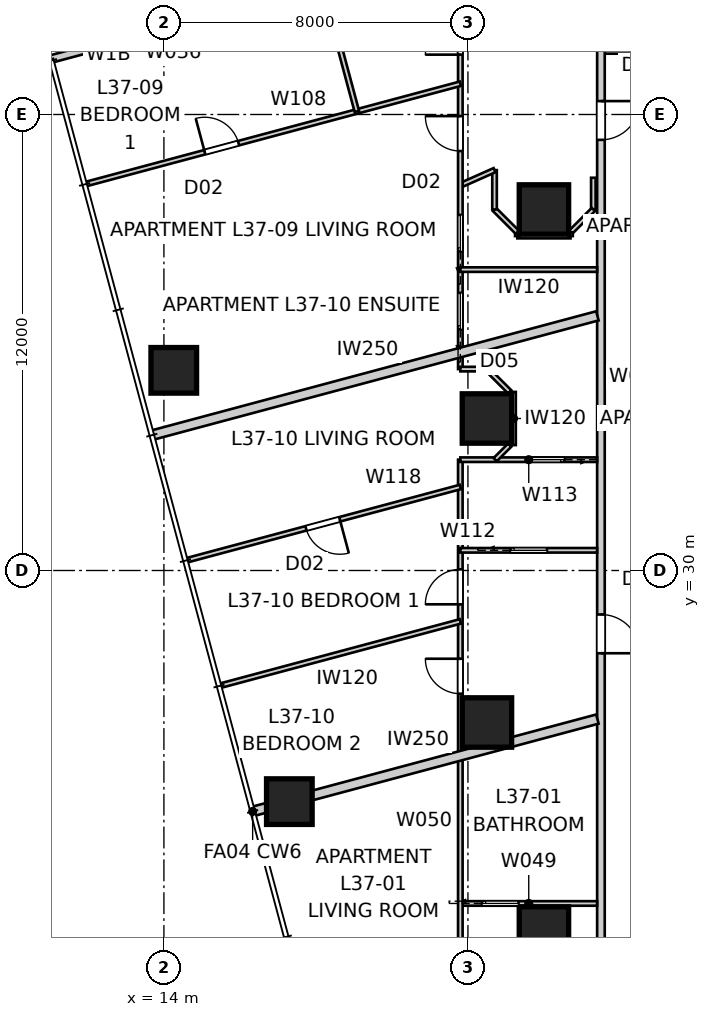
"""IFC4 building model, lengths in metres.
Left out: names, types, materials, properties, quantities, classifications, styles, units other than length and angle.
Written with IfcOpenShell. Run it as: python <this file> out.ifc"""

import sys

from ifc_helpers import new_model, si_unit, direction, frame, frame_2d, origin, origin_2d, place, context, subcontext, project, spatial, rectangle, extrude, element, fill, save


model = new_model("IFC4")
c1 = context("Model", 3, precision=1e-05, world=origin(), true_north=direction((0.0, 1.0)))
c2 = subcontext(c1, "Body", "Model", "MODEL_VIEW")
j1 = project(units=[si_unit("LENGTHUNIT", "METRE"), si_unit("PLANEANGLEUNIT", "RADIAN")], contexts=[c1])
p1 = place(None, origin())
s1 = spatial("IfcSite", under=j1, at=p1, CompositionType="ELEMENT")
p2 = place(p1, origin())
s2 = spatial("IfcBuilding", under=s1, at=p2, CompositionType="ELEMENT")
p3 = place(p2, frame((0.0, 0.0, 135.4)))
s3 = spatial("IfcBuildingStorey", under=s2, at=p3, CompositionType="ELEMENT", Elevation=135.4)
for number, where, z_axis, x_axis in (
    (1, (14.26, 35.267, 0.0), (0.0, 0.0, 1.0), (1.0, 0.0, 0.0)),
    (2, (17.301, 23.918, 0.0), (0.0, 0.0, 1.0), (1.0, 0.0, 0.0)),
):
    element("IfcColumn", number, at=place(p3, frame(where, z_axis=z_axis, x_axis=x_axis)), inside=s3, PredefinedType="COLUMN", context=c2, shape_type="SweptSolid", body=[
        extrude(rectangle(XDim=1.2, YDim=1.2, at=origin_2d()), origin(), (0.0, 0.0, 1.0), 3.2),
    ])
for number, where, z_axis, x_axis in (
    (3, (24.0, 39.5, 0.0), (0.0, 0.0, 1.0), (1.0, 0.0, 0.0)),
    (4, (22.5, 34.0, 0.0), (0.0, 0.0, 1.0), (1.0, 0.0, 0.0)),
    (5, (22.5, 26.0, 0.0), (0.0, 0.0, 1.0), (1.0, 0.0, 0.0)),
    (6, (24.0, 20.5, 0.0), (0.0, 0.0, 1.0), (1.0, 0.0, 0.0)),
):
    element("IfcColumn", number, at=place(p3, frame(where, z_axis=z_axis, x_axis=x_axis)), inside=s3, PredefinedType="COLUMN", context=c2, shape_type="SweptSolid", body=[
        extrude(rectangle(XDim=1.3, YDim=1.3, at=origin_2d()), origin(), (0.0, 0.0, 1.0), 3.4),
    ])
p4 = place(p3, frame((14.893, 44.496, 0.0), z_axis=(0.0, 0.0, 1.0), x_axis=(-0.965934430412, -0.258786931944, 0.0)))
e7 = element("IfcWall", 7, at=p4, inside=s3, PredefinedType="SOLIDWALL", context=c2, shape_type="SweptSolid", body=[
    extrude(rectangle(XDim=4.0, YDim=0.2, at=frame_2d((2.0, 0.0))), origin(), (0.0, 0.0, 1.0), 3.2),
])
p5 = place(p4, frame((1.0, 0.0, 0.4)))
e8 = element("IfcOpeningElement", 8, at=p5, cuts=e7, PredefinedType="OPENING", context=c2, shape_type="SweptSolid", body=[
    extrude(rectangle(XDim=2.0, YDim=1.8, at=frame_2d((1.0, 0.9))), frame((0.0, 0.11, 0.0), z_axis=(0.0, -1.0, 0.0), x_axis=(1.0, 0.0, 0.0)), (0.0, 0.0, 1.0), 0.22),
])
p6 = place(p3, frame((54.5, 43.7, 0.0), z_axis=(0.0, 0.0, 1.0), x_axis=(-1.0, 0.0, 0.0)))
e9 = element("IfcWall", 9, at=p6, inside=s3, PredefinedType="PARTITIONING", context=c2, shape_type="SweptSolid", body=[
    extrude(rectangle(XDim=29.0, YDim=0.2, at=frame_2d((14.5, 0.0))), origin(), (0.0, 0.0, 1.0), 3.2),
])
p7 = place(p6, frame((12.852, 0.0, 0.0)))
e10 = element("IfcOpeningElement", 10, at=p7, cuts=e9, PredefinedType="OPENING", context=c2, shape_type="SweptSolid", body=[
    extrude(rectangle(XDim=1.02, YDim=2.34, at=frame_2d((0.51, 1.17))), frame((0.0, 0.11, 0.0), z_axis=(0.0, -1.0, 0.0), x_axis=(1.0, 0.0, 0.0)), (0.0, 0.0, 1.0), 0.22),
])
p8 = place(p6, frame((5.529, 0.0, 0.0)))
e11 = element("IfcOpeningElement", 11, at=p8, cuts=e9, PredefinedType="OPENING", context=c2, shape_type="SweptSolid", body=[
    extrude(rectangle(XDim=1.02, YDim=2.34, at=frame_2d((0.51, 1.17))), frame((0.0, 0.11, 0.0), z_axis=(0.0, -1.0, 0.0), x_axis=(1.0, 0.0, 0.0)), (0.0, 0.0, 1.0), 0.22),
])
p9 = place(p3, frame((25.5, 43.7, 0.0), z_axis=(0.0, 0.0, 1.0), x_axis=(0.0, -1.0, 0.0)))
e12 = element("IfcWall", 12, at=p9, inside=s3, PredefinedType="PARTITIONING", context=c2, shape_type="SweptSolid", body=[
    extrude(rectangle(XDim=28.2, YDim=0.2, at=frame_2d((14.1, 0.0))), origin(), (0.0, 0.0, 1.0), 3.2),
])
p10 = place(p9, frame((24.646, 0.0, 0.0)))
e13 = element("IfcOpeningElement", 13, at=p10, cuts=e12, PredefinedType="OPENING", context=c2, shape_type="SweptSolid", body=[
    extrude(rectangle(XDim=1.02, YDim=2.0, at=frame_2d((0.51, 1.0))), frame((0.0, 0.11, 0.0), z_axis=(0.0, -1.0, 0.0), x_axis=(1.0, 0.0, 0.0)), (0.0, 0.0, 1.0), 0.22),
])
p11 = place(p9, frame((14.858, 0.0, 0.0)))
e14 = element("IfcOpeningElement", 14, at=p11, cuts=e12, PredefinedType="OPENING", context=c2, shape_type="SweptSolid", body=[
    extrude(rectangle(XDim=1.02, YDim=2.34, at=frame_2d((0.51, 1.17))), frame((0.0, 0.11, 0.0), z_axis=(0.0, -1.0, 0.0), x_axis=(1.0, 0.0, 0.0)), (0.0, 0.0, 1.0), 0.22),
])
p12 = place(p9, frame((1.347, 0.0, 0.0)))
e15 = element("IfcOpeningElement", 15, at=p12, cuts=e12, PredefinedType="OPENING", context=c2, shape_type="SweptSolid", body=[
    extrude(rectangle(XDim=1.02, YDim=2.0, at=frame_2d((0.51, 1.0))), frame((0.0, 0.11, 0.0), z_axis=(0.0, -1.0, 0.0), x_axis=(1.0, 0.0, 0.0)), (0.0, 0.0, 1.0), 0.22),
])
p13 = place(p3, frame((16.335, 23.659, 0.0), z_axis=(0.0, 0.0, 1.0), x_axis=(0.965927049013, 0.258814481793, 0.0)))
e16 = element("IfcWall", 16, at=p13, inside=s3, PredefinedType="PARTITIONING", context=c2, shape_type="SweptSolid", body=[
    extrude(rectangle(XDim=9.392, YDim=0.25, at=frame_2d((4.696, 0.0))), origin(), (0.0, 0.0, 1.0), 3.2),
])
p14 = place(p3, frame((13.682, 33.56, 0.0), z_axis=(0.0, 0.0, 1.0), x_axis=(0.965924438766, 0.258824223352, 0.0)))
e17 = element("IfcWall", 17, at=p14, inside=s3, PredefinedType="PARTITIONING", context=c2, shape_type="SweptSolid", body=[
    extrude(rectangle(XDim=12.138, YDim=0.25, at=frame_2d((6.069, 0.0))), origin(), (0.0, 0.0, 1.0), 3.2),
])
p15 = place(p3, frame((21.8, 21.238, 0.0), z_axis=(0.0, 0.0, 1.0), x_axis=(1.0, 0.0, 0.0)))
e18 = element("IfcWall", 18, at=p15, inside=s3, PredefinedType="PARTITIONING", context=c2, shape_type="SweptSolid", body=[
    extrude(rectangle(XDim=3.6, YDim=0.12, at=frame_2d((1.8, 0.0))), origin(), (0.0, 0.0, 1.0), 2.672),
])
p16 = place(p15, frame((0.57, 0.0, 0.0)))
e19 = element("IfcOpeningElement", 19, at=p16, cuts=e18, PredefinedType="OPENING", context=c2, shape_type="SweptSolid", body=[
    extrude(rectangle(XDim=0.96, YDim=2.1, at=frame_2d((0.48, 1.05))), frame((0.0, 0.07, 0.0), z_axis=(0.0, -1.0, 0.0), x_axis=(1.0, 0.0, 0.0)), (0.0, 0.0, 1.0), 0.14),
])
p17 = place(p3, frame((21.8, 11.8, 0.0), z_axis=(0.0, 0.0, 1.0), x_axis=(0.0, 1.0, 0.0)))
e20 = element("IfcWall", 20, at=p17, inside=s3, PredefinedType="PARTITIONING", context=c2, shape_type="SweptSolid", body=[
    extrude(rectangle(XDim=21.116, YDim=0.12, at=frame_2d((10.558, 0.0))), origin(), (0.0, 0.0, 1.0), 3.2),
])
p18 = place(p17, frame((4.046, 0.0, 0.0)))
e21 = element("IfcOpeningElement", 21, at=p18, cuts=e20, PredefinedType="OPENING", context=c2, shape_type="SweptSolid", body=[
    extrude(rectangle(XDim=0.92, YDim=2.34, at=frame_2d((0.46, 1.17))), frame((0.0, 0.07, 0.0), z_axis=(0.0, -1.0, 0.0), x_axis=(1.0, 0.0, 0.0)), (0.0, 0.0, 1.0), 0.14),
])
p19 = place(p17, frame((7.358, 0.0, 0.0)))
e22 = element("IfcOpeningElement", 22, at=p19, cuts=e20, PredefinedType="OPENING", context=c2, shape_type="SweptSolid", body=[
    extrude(rectangle(XDim=0.92, YDim=2.34, at=frame_2d((0.46, 1.17))), frame((0.0, 0.07, 0.0), z_axis=(0.0, -1.0, 0.0), x_axis=(1.0, 0.0, 0.0)), (0.0, 0.0, 1.0), 0.14),
])
p20 = place(p17, frame((14.958, 0.0, 0.0)))
e23 = element("IfcOpeningElement", 23, at=p20, cuts=e20, PredefinedType="OPENING", context=c2, shape_type="SweptSolid", body=[
    extrude(rectangle(XDim=0.92, YDim=2.34, at=frame_2d((0.46, 1.17))), frame((0.0, 0.07, 0.0), z_axis=(0.0, -1.0, 0.0), x_axis=(1.0, 0.0, 0.0)), (0.0, 0.0, 1.0), 0.14),
])
p21 = place(p17, frame((17.31, 0.0, 0.0)))
e24 = element("IfcOpeningElement", 24, at=p21, cuts=e20, PredefinedType="OPENING", context=c2, shape_type="SweptSolid", body=[
    extrude(rectangle(XDim=0.92, YDim=2.34, at=frame_2d((0.46, 1.17))), frame((0.0, 0.07, 0.0), z_axis=(0.0, -1.0, 0.0), x_axis=(1.0, 0.0, 0.0)), (0.0, 0.0, 1.0), 0.14),
])
p22 = place(p3, frame((25.3, 40.335, 0.0), z_axis=(0.0, 0.0, 1.0), x_axis=(0.0, -1.0, 0.0)))
e25 = element("IfcWall", 25, at=p22, inside=s3, PredefinedType="PARTITIONING", context=c2, shape_type="SweptSolid", body=[
    extrude(rectangle(XDim=0.835, YDim=0.12, at=frame_2d((0.417, 0.0))), origin(), (0.0, 0.0, 1.0), 3.2),
])
p23 = place(p3, frame((25.3, 39.5, 0.0), z_axis=(0.0, 0.0, 1.0), x_axis=(-0.707106781187, -0.707106781187, 0.0)))
e26 = element("IfcWall", 26, at=p23, inside=s3, PredefinedType="PARTITIONING", context=c2, shape_type="SweptSolid", body=[
    extrude(rectangle(XDim=0.849, YDim=0.12, at=frame_2d((0.424, 0.0))), origin(), (0.0, 0.0, 1.0), 3.2),
])
p24 = place(p3, frame((24.7, 38.8, 0.0), z_axis=(0.0, 0.0, 1.0), x_axis=(-1.0, 0.0, 0.0)))
e27 = element("IfcWall", 27, at=p24, inside=s3, PredefinedType="PARTITIONING", context=c2, shape_type="SweptSolid", body=[
    extrude(rectangle(XDim=1.4, YDim=0.12, at=frame_2d((0.7, 0.0))), origin(), (0.0, 0.0, 1.0), 2.672),
])
p25 = place(p3, frame((23.3, 38.9, 0.0), z_axis=(0.0, 0.0, 1.0), x_axis=(-0.707106781187, 0.707106781187, 0.0)))
e28 = element("IfcWall", 28, at=p25, inside=s3, PredefinedType="PARTITIONING", context=c2, shape_type="SweptSolid", body=[
    extrude(rectangle(XDim=0.849, YDim=0.12, at=frame_2d((0.424, 0.0))), origin(), (0.0, 0.0, 1.0), 3.2),
])
p26 = place(p3, frame((22.7, 39.5, 0.0), z_axis=(0.0, 0.0, 1.0), x_axis=(0.0, 1.0, 0.0)))
e29 = element("IfcWall", 29, at=p26, inside=s3, PredefinedType="PARTITIONING", context=c2, shape_type="SweptSolid", body=[
    extrude(rectangle(XDim=1.035, YDim=0.12, at=frame_2d((0.518, 0.0))), origin(), (0.0, 0.0, 1.0), 3.2),
])
p27 = place(p3, frame((22.7, 40.535, 0.0), z_axis=(0.0, 0.0, 1.0), x_axis=(-0.913739977195, -0.406299463544, 0.0)))
e30 = element("IfcWall", 30, at=p27, inside=s3, PredefinedType="PARTITIONING", context=c2, shape_type="SweptSolid", body=[
    extrude(rectangle(XDim=0.985, YDim=0.12, at=frame_2d((0.492, 0.0))), origin(), (0.0, 0.0, 1.0), 3.2),
])
p28 = place(p3, frame((21.8, 35.3, 0.0), z_axis=(0.0, 0.0, 1.0), x_axis=(0.0, 1.0, 0.0)))
e31 = element("IfcWall", 31, at=p28, inside=s3, PredefinedType="PARTITIONING", context=c2, shape_type="SweptSolid", body=[
    extrude(rectangle(XDim=12.45, YDim=0.12, at=frame_2d((6.225, 0.0))), origin(), (0.0, 0.0, 1.0), 2.399),
])
p29 = place(p28, frame((5.738, 0.0, 0.0)))
e32 = element("IfcOpeningElement", 32, at=p29, cuts=e31, PredefinedType="OPENING", context=c2, shape_type="SweptSolid", body=[
    extrude(rectangle(XDim=0.92, YDim=2.34, at=frame_2d((0.46, 1.17))), frame((0.0, 0.07, 0.0), z_axis=(0.0, -1.0, 0.0), x_axis=(1.0, 0.0, 0.0)), (0.0, 0.0, 1.0), 0.14),
])
p30 = place(p28, frame((8.275, 0.0, 0.0)))
e33 = element("IfcOpeningElement", 33, at=p30, cuts=e31, PredefinedType="OPENING", context=c2, shape_type="SweptSolid", body=[
    extrude(rectangle(XDim=0.92, YDim=2.34, at=frame_2d((0.46, 1.17))), frame((0.0, 0.07, 0.0), z_axis=(0.0, -1.0, 0.0), x_axis=(1.0, 0.0, 0.0)), (0.0, 0.0, 1.0), 0.14),
])
p31 = place(p28, frame((3.097, 0.0, 0.0)))
e34 = element("IfcOpeningElement", 34, at=p31, cuts=e31, PredefinedType="OPENING", context=c2, shape_type="SweptSolid", body=[
    extrude(rectangle(XDim=0.96, YDim=2.1, at=frame_2d((0.48, 1.05))), frame((0.0, 0.07, 0.0), z_axis=(0.0, -1.0, 0.0), x_axis=(1.0, 0.0, 0.0)), (0.0, 0.0, 1.0), 0.14),
])
p32 = place(p28, frame((1.047, 0.0, 0.0)))
e35 = element("IfcOpeningElement", 35, at=p32, cuts=e31, PredefinedType="OPENING", context=c2, shape_type="SweptSolid", body=[
    extrude(rectangle(XDim=0.96, YDim=2.1, at=frame_2d((0.48, 1.05))), frame((0.0, 0.07, 0.0), z_axis=(0.0, -1.0, 0.0), x_axis=(1.0, 0.0, 0.0)), (0.0, 0.0, 1.0), 0.14),
])
p33 = place(p3, frame((25.4, 37.918, 0.0), z_axis=(0.0, 0.0, 1.0), x_axis=(-1.0, 0.0, 0.0)))
e36 = element("IfcWall", 36, at=p33, inside=s3, PredefinedType="PARTITIONING", context=c2, shape_type="SweptSolid", body=[
    extrude(rectangle(XDim=3.6, YDim=0.12, at=frame_2d((1.8, 0.0))), origin(), (0.0, 0.0, 1.0), 3.2),
])
p34 = place(p3, frame((11.952, 40.17, 0.0), z_axis=(0.0, 0.0, 1.0), x_axis=(0.965923039694, 0.258829444594, 0.0)))
e37 = element("IfcWall", 37, at=p34, inside=s3, PredefinedType="PARTITIONING", context=c2, shape_type="SweptSolid", body=[
    extrude(rectangle(XDim=10.196, YDim=0.12, at=frame_2d((5.098, 0.0))), origin(), (0.0, 0.0, 1.0), 3.2),
])
p35 = place(p34, frame((3.233, 0.0, 0.0)))
e38 = element("IfcOpeningElement", 38, at=p35, cuts=e37, PredefinedType="OPENING", context=c2, shape_type="SweptSolid", body=[
    extrude(rectangle(XDim=0.92, YDim=2.34, at=frame_2d((0.46, 1.17))), frame((0.0, 0.07, 0.0), z_axis=(0.0, -1.0, 0.0), x_axis=(1.0, 0.0, 0.0)), (0.0, 0.0, 1.0), 0.14),
])
p36 = place(p3, frame((17.168, 49.205, 0.0), z_axis=(0.0, 0.0, 1.0), x_axis=(0.258846923464, -0.965918355874, 0.0)))
e39 = element("IfcWall", 39, at=p36, inside=s3, PredefinedType="PARTITIONING", context=c2, shape_type="SweptSolid", body=[
    extrude(rectangle(XDim=7.377, YDim=0.12, at=frame_2d((3.688, 0.0))), origin(), (0.0, 0.0, 1.0), 3.2),
])
p37 = place(p36, frame((1.525, 0.0, 0.0)))
e40 = element("IfcOpeningElement", 40, at=p37, cuts=e39, PredefinedType="OPENING", context=c2, shape_type="SweptSolid", body=[
    extrude(rectangle(XDim=0.92, YDim=2.34, at=frame_2d((0.46, 1.17))), frame((0.0, 0.07, 0.0), z_axis=(0.0, -1.0, 0.0), x_axis=(1.0, 0.0, 0.0)), (0.0, 0.0, 1.0), 0.14),
])
p38 = place(p3, frame((21.8, 30.531, 0.0), z_axis=(0.0, 0.0, 1.0), x_axis=(1.0, 0.0, 0.0)))
e41 = element("IfcWall", 41, at=p38, inside=s3, PredefinedType="PARTITIONING", context=c2, shape_type="SweptSolid", body=[
    extrude(rectangle(XDim=3.6, YDim=0.12, at=frame_2d((1.8, 0.0))), origin(), (0.0, 0.0, 1.0), 3.2),
])
p39 = place(p38, frame((1.32, 0.0, 0.0)))
e42 = element("IfcOpeningElement", 42, at=p39, cuts=e41, PredefinedType="OPENING", context=c2, shape_type="SweptSolid", body=[
    extrude(rectangle(XDim=0.96, YDim=2.1, at=frame_2d((0.48, 1.05))), frame((0.0, 0.07, 0.0), z_axis=(0.0, -1.0, 0.0), x_axis=(1.0, 0.0, 0.0)), (0.0, 0.0, 1.0), 0.14),
])
p40 = place(p3, frame((25.4, 32.916, 0.0), z_axis=(0.0, 0.0, 1.0), x_axis=(-1.0, 0.0, 0.0)))
e43 = element("IfcWall", 43, at=p40, inside=s3, PredefinedType="PARTITIONING", context=c2, shape_type="SweptSolid", body=[
    extrude(rectangle(XDim=3.6, YDim=0.12, at=frame_2d((1.8, 0.0))), origin(), (0.0, 0.0, 1.0), 2.672),
])
p41 = place(p40, frame((0.862, 0.0, 0.0)))
e44 = element("IfcOpeningElement", 44, at=p41, cuts=e43, PredefinedType="OPENING", context=c2, shape_type="SweptSolid", body=[
    extrude(rectangle(XDim=0.96, YDim=2.1, at=frame_2d((0.48, 1.05))), frame((0.0, 0.07, 0.0), z_axis=(0.0, -1.0, 0.0), x_axis=(1.0, 0.0, 0.0)), (0.0, 0.0, 1.0), 0.14),
])
p42 = place(p3, frame((22.716, 32.916, 0.0), z_axis=(0.0, 0.0, 1.0), x_axis=(0.707106781187, 0.707106781187, 0.0)))
e45 = element("IfcWall", 45, at=p42, inside=s3, PredefinedType="PARTITIONING", context=c2, shape_type="SweptSolid", body=[
    extrude(rectangle(XDim=0.543, YDim=0.12, at=frame_2d((0.271, 0.0))), origin(), (0.0, 0.0, 1.0), 3.2),
])
p43 = place(p3, frame((23.2, 33.3, 0.0), z_axis=(0.0, 0.0, 1.0), x_axis=(0.0, 1.0, 0.0)))
e46 = element("IfcWall", 46, at=p43, inside=s3, PredefinedType="PARTITIONING", context=c2, shape_type="SweptSolid", body=[
    extrude(rectangle(XDim=1.4, YDim=0.12, at=frame_2d((0.7, 0.0))), origin(), (0.0, 0.0, 1.0), 3.2),
])
p44 = place(p3, frame((23.1, 34.7, 0.0), z_axis=(0.0, 0.0, 1.0), x_axis=(-0.707106781187, 0.707106781187, 0.0)))
e47 = element("IfcWall", 47, at=p44, inside=s3, PredefinedType="PARTITIONING", context=c2, shape_type="SweptSolid", body=[
    extrude(rectangle(XDim=0.849, YDim=0.12, at=frame_2d((0.424, 0.0))), origin(), (0.0, 0.0, 1.0), 3.2),
])
p45 = place(p3, frame((22.5, 35.3, 0.0), z_axis=(0.0, 0.0, 1.0), x_axis=(-1.0, 0.0, 0.0)))
e48 = element("IfcWall", 48, at=p45, inside=s3, PredefinedType="PARTITIONING", context=c2, shape_type="SweptSolid", body=[
    extrude(rectangle(XDim=0.7, YDim=0.12, at=frame_2d((0.35, 0.0))), origin(), (0.0, 0.0, 1.0), 3.2),
])
p46 = place(p3, frame((21.8, 32.198, 0.0), z_axis=(0.0, 0.0, 1.0), x_axis=(-0.965923619242, -0.258827281774, 0.0)))
e49 = element("IfcWall", 49, at=p46, inside=s3, PredefinedType="PARTITIONING", context=c2, shape_type="SweptSolid", body=[
    extrude(rectangle(XDim=7.449, YDim=0.12, at=frame_2d((3.725, 0.0))), origin(), (0.0, 0.0, 1.0), 3.2),
])
p47 = place(p46, frame((3.284, 0.0, 0.0)))
e50 = element("IfcOpeningElement", 50, at=p47, cuts=e49, PredefinedType="OPENING", context=c2, shape_type="SweptSolid", body=[
    extrude(rectangle(XDim=0.92, YDim=2.34, at=frame_2d((0.46, 1.17))), frame((0.0, 0.07, 0.0), z_axis=(0.0, -1.0, 0.0), x_axis=(1.0, 0.0, 0.0)), (0.0, 0.0, 1.0), 0.14),
])
p48 = place(p3, frame((21.8, 28.661, 0.0), z_axis=(0.0, 0.0, 1.0), x_axis=(-0.96591852682, -0.258846285554, 0.0)))
e51 = element("IfcWall", 51, at=p48, inside=s3, PredefinedType="PARTITIONING", context=c2, shape_type="SweptSolid", body=[
    extrude(rectangle(XDim=6.533, YDim=0.12, at=frame_2d((3.267, 0.0))), origin(), (0.0, 0.0, 1.0), 3.2),
])
for number, where, z_axis, x_axis in (
    (52, (24.7, 38.8, 0.0), (0.0, 0.0, 1.0), (0.0, 1.0, 0.0)),
    (53, (23.3, 38.8, 0.0), (0.0, 0.0, 1.0), (0.0, 1.0, 0.0)),
):
    element("IfcWall", number, at=place(p3, frame(where, z_axis=z_axis, x_axis=x_axis)), inside=s3, PredefinedType="PARTITIONING", context=c2, shape_type="SweptSolid", body=[
        extrude(rectangle(XDim=0.1, YDim=0.12, at=frame_2d((0.05, 0.0))), origin(), (0.0, 0.0, 1.0), 3.2),
    ])
p49 = place(p11, origin())
e54 = element("IfcDoor", 54, at=p49, inside=s3, OperationType="SINGLE_SWING_RIGHT", PredefinedType="DOOR", context=c2, shape_type="SweptSolid", body=[
    extrude(rectangle(XDim=1.02, YDim=2.34, at=frame_2d((0.51, 1.17))), frame((0.0, 0.025, 0.0), z_axis=(0.0, -1.0, 0.0), x_axis=(1.0, 0.0, 0.0)), (0.0, 0.0, 1.0), 0.05),
])
fill(e14, e54)
p50 = place(p12, origin())
e55 = element("IfcDoor", 55, at=p50, inside=s3, OperationType="SINGLE_SWING_LEFT", PredefinedType="DOOR", context=c2, shape_type="SweptSolid", body=[
    extrude(rectangle(XDim=1.02, YDim=2.0, at=frame_2d((0.51, 1.0))), frame((0.0, 0.025, 0.0), z_axis=(0.0, -1.0, 0.0), x_axis=(1.0, 0.0, 0.0)), (0.0, 0.0, 1.0), 0.05),
])
fill(e15, e55)
p51 = place(p16, origin())
e56 = element("IfcDoor", 56, at=p51, inside=s3, OperationType="SLIDING_TO_LEFT", PredefinedType="DOOR", context=c2, shape_type="SweptSolid", body=[
    extrude(rectangle(XDim=0.96, YDim=2.1, at=frame_2d((0.48, 1.05))), frame((0.0, 0.025, 0.0), z_axis=(0.0, -1.0, 0.0), x_axis=(1.0, 0.0, 0.0)), (0.0, 0.0, 1.0), 0.05),
])
fill(e19, e56)
p52 = place(p39, origin())
e57 = element("IfcDoor", 57, at=p52, inside=s3, OperationType="SLIDING_TO_LEFT", PredefinedType="DOOR", context=c2, shape_type="SweptSolid", body=[
    extrude(rectangle(XDim=0.96, YDim=2.1, at=frame_2d((0.48, 1.05))), frame((0.0, 0.025, 0.0), z_axis=(0.0, -1.0, 0.0), x_axis=(1.0, 0.0, 0.0)), (0.0, 0.0, 1.0), 0.05),
])
fill(e42, e57)
p53 = place(p20, origin())
e58 = element("IfcDoor", 58, at=p53, inside=s3, OperationType="SINGLE_SWING_RIGHT", PredefinedType="DOOR", context=c2, shape_type="SweptSolid", body=[
    extrude(rectangle(XDim=0.92, YDim=2.34, at=frame_2d((0.46, 1.17))), frame((0.0, 0.025, 0.0), z_axis=(0.0, -1.0, 0.0), x_axis=(1.0, 0.0, 0.0)), (0.0, 0.0, 1.0), 0.05),
])
fill(e23, e58)
p54 = place(p21, origin())
e59 = element("IfcDoor", 59, at=p54, inside=s3, OperationType="SINGLE_SWING_LEFT", PredefinedType="DOOR", context=c2, shape_type="SweptSolid", body=[
    extrude(rectangle(XDim=0.92, YDim=2.34, at=frame_2d((0.46, 1.17))), frame((0.0, 0.025, 0.0), z_axis=(0.0, -1.0, 0.0), x_axis=(1.0, 0.0, 0.0)), (0.0, 0.0, 1.0), 0.05),
])
fill(e24, e59)
p55 = place(p29, origin())
e60 = element("IfcDoor", 60, at=p55, inside=s3, OperationType="SINGLE_SWING_RIGHT", PredefinedType="DOOR", context=c2, shape_type="SweptSolid", body=[
    extrude(rectangle(XDim=0.92, YDim=2.34, at=frame_2d((0.46, 1.17))), frame((0.0, 0.025, 0.0), z_axis=(0.0, -1.0, 0.0), x_axis=(1.0, 0.0, 0.0)), (0.0, 0.0, 1.0), 0.05),
])
fill(e32, e60)
p56 = place(p30, origin())
e61 = element("IfcDoor", 61, at=p56, inside=s3, OperationType="SINGLE_SWING_LEFT", PredefinedType="DOOR", context=c2, shape_type="SweptSolid", body=[
    extrude(rectangle(XDim=0.92, YDim=2.34, at=frame_2d((0.46, 1.17))), frame((0.0, 0.025, 0.0), z_axis=(0.0, -1.0, 0.0), x_axis=(1.0, 0.0, 0.0)), (0.0, 0.0, 1.0), 0.05),
])
fill(e33, e61)
p57 = place(p41, origin())
e62 = element("IfcDoor", 62, at=p57, inside=s3, OperationType="SLIDING_TO_LEFT", PredefinedType="DOOR", context=c2, shape_type="SweptSolid", body=[
    extrude(rectangle(XDim=0.96, YDim=2.1, at=frame_2d((0.48, 1.05))), frame((0.0, 0.025, 0.0), z_axis=(0.0, -1.0, 0.0), x_axis=(1.0, 0.0, 0.0)), (0.0, 0.0, 1.0), 0.05),
])
fill(e44, e62)
p58 = place(p35, origin())
e63 = element("IfcDoor", 63, at=p58, inside=s3, OperationType="SINGLE_SWING_LEFT", PredefinedType="DOOR", context=c2, shape_type="SweptSolid", body=[
    extrude(rectangle(XDim=0.92, YDim=2.34, at=frame_2d((0.46, 1.17))), frame((0.0, 0.025, 0.0), z_axis=(0.0, -1.0, 0.0), x_axis=(1.0, 0.0, 0.0)), (0.0, 0.0, 1.0), 0.05),
])
fill(e38, e63)
p59 = place(p31, origin())
e64 = element("IfcDoor", 64, at=p59, inside=s3, OperationType="SLIDING_TO_LEFT", PredefinedType="DOOR", context=c2, shape_type="SweptSolid", body=[
    extrude(rectangle(XDim=0.96, YDim=2.1, at=frame_2d((0.48, 1.05))), frame((0.0, 0.025, 0.0), z_axis=(0.0, -1.0, 0.0), x_axis=(1.0, 0.0, 0.0)), (0.0, 0.0, 1.0), 0.05),
])
fill(e34, e64)
p60 = place(p32, origin())
e65 = element("IfcDoor", 65, at=p60, inside=s3, OperationType="SLIDING_TO_LEFT", PredefinedType="DOOR", context=c2, shape_type="SweptSolid", body=[
    extrude(rectangle(XDim=0.96, YDim=2.1, at=frame_2d((0.48, 1.05))), frame((0.0, 0.025, 0.0), z_axis=(0.0, -1.0, 0.0), x_axis=(1.0, 0.0, 0.0)), (0.0, 0.0, 1.0), 0.05),
])
fill(e35, e65)
p61 = place(p47, origin())
e66 = element("IfcDoor", 66, at=p61, inside=s3, OperationType="SINGLE_SWING_LEFT", PredefinedType="DOOR", context=c2, shape_type="SweptSolid", body=[
    extrude(rectangle(XDim=0.92, YDim=2.34, at=frame_2d((0.46, 1.17))), frame((0.0, 0.025, 0.0), z_axis=(0.0, -1.0, 0.0), x_axis=(1.0, 0.0, 0.0)), (0.0, 0.0, 1.0), 0.05),
])
fill(e50, e66)
save(model, sys.argv[1])
